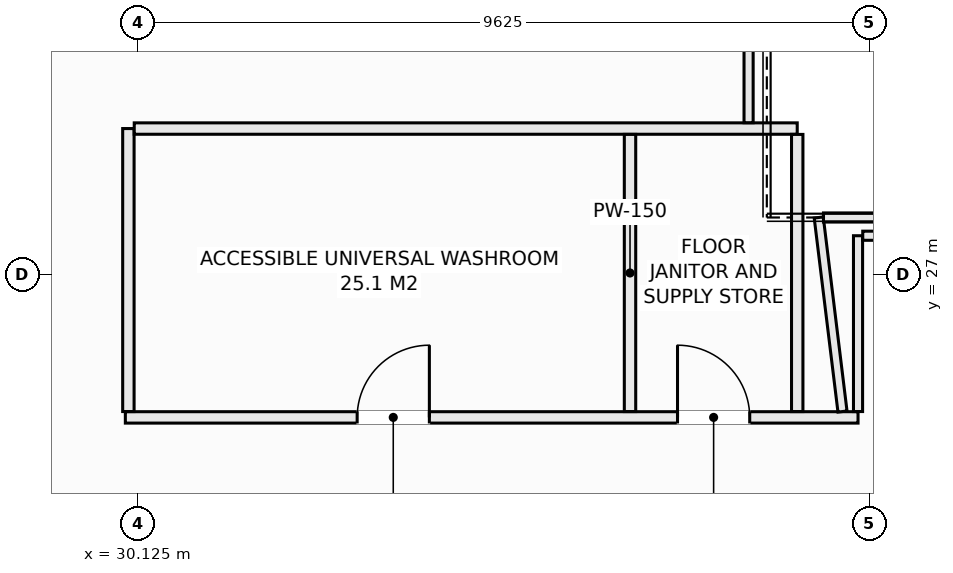
"""IFC4 building model, lengths in metres.
Left out: names, types, materials, properties, quantities, classifications, styles, units other than length and angle.
Written with IfcOpenShell. Run it as: python <this file> out.ifc"""

import sys

from ifc_helpers import new_model, si_unit, direction, frame, frame_2d, origin, place, context, subcontext, project, spatial, rectangle, extrude, element, fill, save


model = new_model("IFC4")
c1 = context("Model", 3, precision=1e-05, world=origin(), true_north=direction((0.0, 1.0)))
c2 = subcontext(c1, "Body", "Model", "MODEL_VIEW")
j1 = project(units=[si_unit("LENGTHUNIT", "METRE"), si_unit("PLANEANGLEUNIT", "RADIAN")], contexts=[c1])
p1 = place(None, origin())
s1 = spatial("IfcSite", under=j1, at=p1, CompositionType="ELEMENT")
p2 = place(p1, origin())
s2 = spatial("IfcBuilding", under=s1, at=p2, CompositionType="ELEMENT")
p3 = place(p2, frame((0.0, 0.0, 209.6)))
s3 = spatial("IfcBuildingStorey", under=s2, at=p3, CompositionType="ELEMENT", Elevation=209.6)
p4 = place(p3, frame((29.96, 25.12, 0.0), z_axis=(0.0, 0.0, 1.0), x_axis=(1.0, 0.0, 0.0)))
e1 = element("IfcWall", 1, at=p4, inside=s3, PredefinedType="PARTITIONING", context=c2, shape_type="SweptSolid", body=[
    extrude(rectangle(XDim=9.64, YDim=0.15, at=frame_2d((4.82, 0.0))), origin(), (0.0, 0.0, 1.0), 3.03),
])
p5 = place(p4, frame((3.05, 0.0, 0.0)))
e2 = element("IfcOpeningElement", 2, at=p5, cuts=e1, PredefinedType="OPENING", context=c2, shape_type="SweptSolid", body=[
    extrude(rectangle(XDim=0.95, YDim=2.1, at=frame_2d((0.475, 1.05))), frame((0.0, 0.085, 0.0), z_axis=(0.0, -1.0, 0.0), x_axis=(1.0, 0.0, 0.0)), (0.0, 0.0, 1.0), 0.17),
])
p6 = place(p4, frame((7.265, 0.0, 0.0)))
e3 = element("IfcOpeningElement", 3, at=p6, cuts=e1, PredefinedType="OPENING", context=c2, shape_type="SweptSolid", body=[
    extrude(rectangle(XDim=0.95, YDim=2.1, at=frame_2d((0.475, 1.05))), frame((0.0, 0.085, 0.0), z_axis=(0.0, -1.0, 0.0), x_axis=(1.0, 0.0, 0.0)), (0.0, 0.0, 1.0), 0.17),
])
p7 = place(p3, frame((30.0, 25.197, 0.0), z_axis=(0.0, 0.0, 1.0), x_axis=(0.0, 1.0, 0.0)))
e4 = element("IfcWall", 4, at=p7, inside=s3, PredefinedType="PARTITIONING", context=c2, shape_type="SweptSolid", body=[
    extrude(rectangle(XDim=3.723, YDim=0.15, at=frame_2d((1.861, 0.0))), origin(), (0.0, 0.0, 1.0), 3.03),
])
p8 = place(p3, frame((30.077, 28.92, 0.0), z_axis=(0.0, 0.0, 1.0), x_axis=(1.0, 0.0, 0.0)))
e5 = element("IfcWall", 5, at=p8, inside=s3, PredefinedType="PARTITIONING", context=c2, shape_type="SweptSolid", body=[
    extrude(rectangle(XDim=8.723, YDim=0.15, at=frame_2d((4.362, 0.0))), origin(), (0.0, 0.0, 1.0), 3.03),
])
for number, where, z_axis, x_axis in (
    (6, (36.6, 25.197, 0.0), (0.0, 0.0, 1.0), (0.0, 1.0, 0.0)),
    (7, (38.8, 25.197, 0.0), (0.0, 0.0, 1.0), (0.0, 1.0, 0.0)),
):
    element("IfcWall", number, at=place(p3, frame(where, z_axis=z_axis, x_axis=x_axis)), inside=s3, PredefinedType="PARTITIONING", context=c2, shape_type="SweptSolid", body=[
        extrude(rectangle(XDim=3.646, YDim=0.15, at=frame_2d((1.823, 0.0))), origin(), (0.0, 0.0, 1.0), 3.03),
    ])
p9 = place(p3, frame((38.16, 28.997, 0.0), z_axis=(0.0, 0.0, 1.0), x_axis=(0.0, 1.0, 0.0)))
e8 = element("IfcWall", 8, at=p9, inside=s3, PredefinedType="PARTITIONING", context=c2, shape_type="SweptSolid", body=[
    extrude(rectangle(XDim=2.061, YDim=0.12, at=frame_2d((1.031, 0.0))), origin(), (0.0, 0.0, 1.0), 3.03),
])
p10 = place(p3, frame((39.6, 25.197, 0.0), z_axis=(0.0, 0.0, 1.0), x_axis=(0.0, 1.0, 0.0)))
e9 = element("IfcWall", 9, at=p10, inside=s3, PredefinedType="PARTITIONING", context=c2, shape_type="SweptSolid", body=[
    extrude(rectangle(XDim=2.313, YDim=0.12, at=frame_2d((1.156, 0.0))), origin(), (0.0, 0.0, 1.0), 3.03),
])
p11 = place(p3, frame((39.662, 27.51, 0.0), z_axis=(0.0, 0.0, 1.0), x_axis=(1.0, 0.0, 0.0)))
e10 = element("IfcWall", 10, at=p11, inside=s3, PredefinedType="PARTITIONING", context=c2, shape_type="SweptSolid", body=[
    extrude(rectangle(XDim=1.858, YDim=0.12, at=frame_2d((0.929, 0.0))), origin(), (0.0, 0.0, 1.0), 3.03),
])
p12 = place(p3, frame((39.083, 27.75, 0.0), z_axis=(0.0, 0.0, 1.0), x_axis=(0.121499202199, -0.992591529213, 0.0)))
e11 = element("IfcWall", 11, at=p12, inside=s3, PredefinedType="PARTITIONING", context=c2, shape_type="SweptSolid", body=[
    extrude(rectangle(XDim=2.572, YDim=0.12, at=frame_2d((1.286, 0.0))), origin(), (0.0, 0.0, 1.0), 3.03),
])
p13 = place(p3, frame((39.146, 27.75, 0.0), z_axis=(0.0, 0.0, 1.0), x_axis=(1.0, 0.0, 0.0)))
e12 = element("IfcWall", 12, at=p13, inside=s3, PredefinedType="PARTITIONING", context=c2, shape_type="SweptSolid", body=[
    extrude(rectangle(XDim=4.955, YDim=0.12, at=frame_2d((2.477, 0.0))), origin(), (0.0, 0.0, 1.0), 3.03),
])
p14 = place(p5, origin())
e13 = element("IfcDoor", 13, at=p14, inside=s3, OperationType="SINGLE_SWING_RIGHT", PredefinedType="DOOR", context=c2, shape_type="SweptSolid", body=[
    extrude(rectangle(XDim=0.95, YDim=2.1, at=frame_2d((0.475, 1.05))), frame((0.0, 0.025, 0.0), z_axis=(0.0, -1.0, 0.0), x_axis=(1.0, 0.0, 0.0)), (0.0, 0.0, 1.0), 0.05),
])
fill(e2, e13)
p15 = place(p6, origin())
e14 = element("IfcDoor", 14, at=p15, inside=s3, OperationType="SINGLE_SWING_LEFT", PredefinedType="DOOR", context=c2, shape_type="SweptSolid", body=[
    extrude(rectangle(XDim=0.95, YDim=2.1, at=frame_2d((0.475, 1.05))), frame((0.0, 0.025, 0.0), z_axis=(0.0, -1.0, 0.0), x_axis=(1.0, 0.0, 0.0)), (0.0, 0.0, 1.0), 0.05),
])
fill(e3, e14)
save(model, sys.argv[1])
